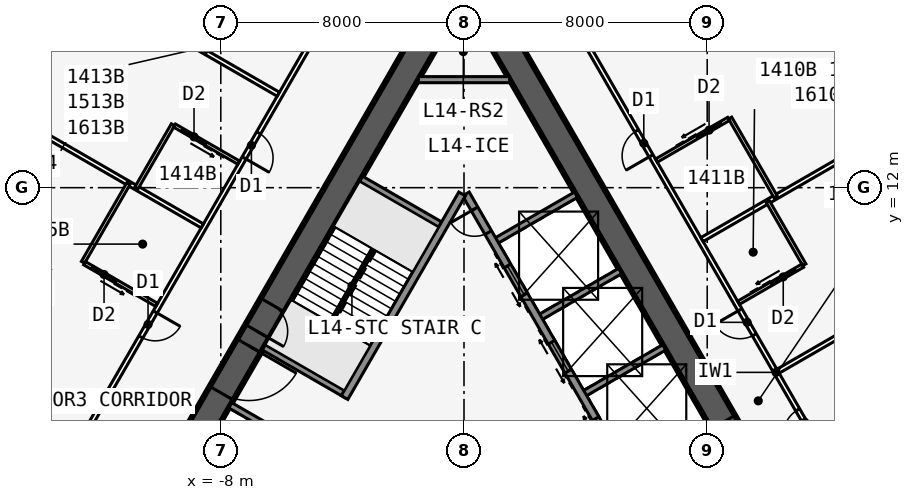
"""IFC4 building model, lengths in metres.
Left out: names, types, materials, properties, quantities, classifications, styles, units other than length and angle.
Written with IfcOpenShell. Run it as: python <this file> out.ifc"""

import sys

from ifc_helpers import new_model, si_unit, direction, frame, frame_2d, origin, place, context, subcontext, project, spatial, rectangle, extrude, element, fill, save


model = new_model("IFC4")
c1 = context("Model", 3, precision=1e-05, world=origin(), true_north=direction((0.0, 1.0)))
c2 = subcontext(c1, "Body", "Model", "MODEL_VIEW")
j1 = project(units=[si_unit("LENGTHUNIT", "METRE"), si_unit("PLANEANGLEUNIT", "RADIAN")], contexts=[c1])
p1 = place(None, origin())
s1 = spatial("IfcSite", under=j1, at=p1, CompositionType="ELEMENT")
p2 = place(p1, origin())
s2 = spatial("IfcBuilding", under=s1, at=p2, CompositionType="ELEMENT")
p3 = place(p2, frame((0.0, 0.0, 59.1)))
s3 = spatial("IfcBuildingStorey", under=s2, at=p3, CompositionType="ELEMENT", Elevation=59.1)
p4 = place(p3, frame((16.5, -9.526, 0.0), z_axis=(0.0, 0.0, 1.0), x_axis=(-0.499999749417, 0.866025548458, 0.0)))
e1 = element("IfcWall", 1, at=p4, inside=s3, PredefinedType="SHEAR", context=c2, shape_type="SweptSolid", body=[
    extrude(rectangle(XDim=33.0, YDim=0.9, at=frame_2d((16.5, 0.0))), origin(), (0.0, 0.0, 1.0), 3.4),
])
p5 = place(p4, frame((14.15, 0.0, 0.0)))
e2 = element("IfcOpeningElement", 2, at=p5, cuts=e1, PredefinedType="OPENING", context=c2, shape_type="SweptSolid", body=[
    extrude(rectangle(XDim=1.8, YDim=2.13, at=frame_2d((0.9, 1.065))), frame((0.0, 0.46, 0.0), z_axis=(0.0, -1.0, 0.0), x_axis=(1.0, 0.0, 0.0)), (0.0, 0.0, 1.0), 0.92),
])
p6 = place(p4, frame((12.6, 0.0, 0.0)))
e3 = element("IfcOpeningElement", 3, at=p6, cuts=e1, PredefinedType="OPENING", context=c2, shape_type="SweptSolid", body=[
    extrude(rectangle(XDim=1.0, YDim=2.13, at=frame_2d((0.5, 1.065))), frame((0.0, 0.46, 0.0), z_axis=(0.0, -1.0, 0.0), x_axis=(1.0, 0.0, 0.0)), (0.0, 0.0, 1.0), 0.92),
])
p7 = place(p3, frame((5.379, 2.586, 0.0), z_axis=(0.0, 0.0, 1.0), x_axis=(-0.500001375892, 0.866024609411, 0.0)))
e4 = element("IfcWall", 4, at=p7, inside=s3, PredefinedType="SOLIDWALL", context=c2, shape_type="SweptSolid", body=[
    extrude(rectangle(XDim=10.633, YDim=0.25, at=frame_2d((5.316, 0.0))), origin(), (0.0, 0.0, 1.0), 3.235),
])
p8 = place(p7, frame((9.164, 0.0, 0.0)))
e5 = element("IfcOpeningElement", 5, at=p8, cuts=e4, PredefinedType="OPENING", context=c2, shape_type="SweptSolid", body=[
    extrude(rectangle(XDim=0.9, YDim=2.13, at=frame_2d((0.45, 1.065))), frame((0.0, 0.135, 0.0), z_axis=(0.0, -1.0, 0.0), x_axis=(1.0, 0.0, 0.0)), (0.0, 0.0, 1.0), 0.27),
])
p9 = place(p7, frame((1.0, 0.0, 0.0)))
e6 = element("IfcOpeningElement", 6, at=p9, cuts=e4, PredefinedType="OPENING", context=c2, shape_type="SweptSolid", body=[
    extrude(rectangle(XDim=1.1, YDim=2.13, at=frame_2d((0.55, 1.065))), frame((0.0, 0.135, 0.0), z_axis=(0.0, -1.0, 0.0), x_axis=(1.0, 0.0, 0.0)), (0.0, 0.0, 1.0), 0.27),
])
p10 = place(p7, frame((3.9, 0.0, 0.0)))
e7 = element("IfcOpeningElement", 7, at=p10, cuts=e4, PredefinedType="OPENING", context=c2, shape_type="SweptSolid", body=[
    extrude(rectangle(XDim=1.1, YDim=2.13, at=frame_2d((0.55, 1.065))), frame((0.0, 0.135, 0.0), z_axis=(0.0, -1.0, 0.0), x_axis=(1.0, 0.0, 0.0)), (0.0, 0.0, 1.0), 0.27),
])
p11 = place(p7, frame((6.8, 0.0, 0.0)))
e8 = element("IfcOpeningElement", 8, at=p11, cuts=e4, PredefinedType="OPENING", context=c2, shape_type="SweptSolid", body=[
    extrude(rectangle(XDim=1.1, YDim=2.13, at=frame_2d((0.55, 1.065))), frame((0.0, 0.135, 0.0), z_axis=(0.0, -1.0, 0.0), x_axis=(1.0, 0.0, 0.0)), (0.0, 0.0, 1.0), 0.27),
])
for number, where, z_axis, x_axis in (
    (9, (3.879, 5.184, 0.0), (0.0, 0.0, 1.0), (0.866, 0.5, 0.0)),
    (10, (2.429, 7.696, 0.0), (0.0, 0.0, 1.0), (0.866, 0.5, 0.0)),
    (11, (0.979, 10.207, 0.0), (0.0, 0.0, 1.0), (0.866, 0.5, 0.0)),
):
    element("IfcWall", number, at=place(p3, frame(where, z_axis=z_axis, x_axis=x_axis)), inside=s3, PredefinedType="SOLIDWALL", context=c2, shape_type="SweptSolid", body=[
        extrude(rectangle(XDim=3.125, YDim=0.2, at=frame_2d((1.562, 0.0))), origin(), (0.0, 0.0, 1.0), 3.235),
    ])
p12 = place(p3, frame((0.0, 19.052, 0.0), z_axis=(0.0, 0.0, 1.0), x_axis=(-0.499999749417, -0.866025548458, 0.0)))
e12 = element("IfcWall", 12, at=p12, inside=s3, PredefinedType="SHEAR", context=c2, shape_type="SweptSolid", body=[
    extrude(rectangle(XDim=33.0, YDim=0.9, at=frame_2d((16.5, 0.0))), origin(), (0.0, 0.0, 1.0), 3.4),
])
p13 = place(p12, frame((14.15, 0.0, 0.0)))
e13 = element("IfcOpeningElement", 13, at=p13, cuts=e12, PredefinedType="OPENING", context=c2, shape_type="SweptSolid", body=[
    extrude(rectangle(XDim=1.8, YDim=2.13, at=frame_2d((0.9, 1.065))), frame((0.0, 0.46, 0.0), z_axis=(0.0, -1.0, 0.0), x_axis=(1.0, 0.0, 0.0)), (0.0, 0.0, 1.0), 0.92),
])
p14 = place(p12, frame((12.6, 0.0, 0.0)))
e14 = element("IfcOpeningElement", 14, at=p14, cuts=e12, PredefinedType="OPENING", context=c2, shape_type="SweptSolid", body=[
    extrude(rectangle(XDim=1.0, YDim=2.13, at=frame_2d((0.5, 1.065))), frame((0.0, 0.46, 0.0), z_axis=(0.0, -1.0, 0.0), x_axis=(1.0, 0.0, 0.0)), (0.0, 0.0, 1.0), 0.92),
])
p15 = place(p3, frame((-0.062, 11.794, 0.0), z_axis=(0.0, 0.0, 1.0), x_axis=(-0.500006680225, -0.86602154692, 0.0)))
e15 = element("IfcWall", 15, at=p15, inside=s3, PredefinedType="SOLIDWALL", context=c2, shape_type="SweptSolid", body=[
    extrude(rectangle(XDim=7.733, YDim=0.25, at=frame_2d((3.866, 0.0))), origin(), (0.0, 0.0, 1.0), 3.235),
])
for number, where, z_axis, x_axis in (
    (16, (-0.679, 10.727, 0.0), (0.0, 0.0, 1.0), (-0.866, 0.5, 0.0)),
    (17, (-3.879, 5.184, 0.0), (0.0, 0.0, 1.0), (-0.866, 0.5, 0.0)),
    (18, (-4.979, 3.279, 0.0), (0.0, 0.0, 1.0), (-0.866, 0.5, 0.0)),
):
    element("IfcWall", number, at=place(p3, frame(where, z_axis=z_axis, x_axis=x_axis)), inside=s3, PredefinedType="SOLIDWALL", context=c2, shape_type="SweptSolid", body=[
        extrude(rectangle(XDim=3.125, YDim=0.2, at=frame_2d((1.562, 0.0))), origin(), (0.0, 0.0, 1.0), 3.235),
    ])
p16 = place(p3, frame((20.027, -10.985, 0.0), z_axis=(0.0, 0.0, 1.0), x_axis=(-0.500001677587, 0.866024435227, 0.0)))
e19 = element("IfcWall", 19, at=p16, inside=s3, PredefinedType="PARTITIONING", context=c2, shape_type="SweptSolid", body=[
    extrude(rectangle(XDim=39.054, YDim=0.15, at=frame_2d((19.527, 0.0))), origin(), (0.0, 0.0, 1.0), 3.235),
])
p17 = place(p16, frame((0.352, 0.0, 0.0)))
e20 = element("IfcOpeningElement", 20, at=p17, cuts=e19, PredefinedType="OPENING", context=c2, shape_type="SweptSolid", body=[
    extrude(rectangle(XDim=0.95, YDim=2.13, at=frame_2d((0.475, 1.065))), frame((0.0, 0.085, 0.0), z_axis=(0.0, -1.0, 0.0), x_axis=(1.0, 0.0, 0.0)), (0.0, 0.0, 1.0), 0.17),
])
p18 = place(p16, frame((10.352, 0.0, 0.0)))
e21 = element("IfcOpeningElement", 21, at=p18, cuts=e19, PredefinedType="OPENING", context=c2, shape_type="SweptSolid", body=[
    extrude(rectangle(XDim=0.95, YDim=2.13, at=frame_2d((0.475, 1.065))), frame((0.0, 0.085, 0.0), z_axis=(0.0, -1.0, 0.0), x_axis=(1.0, 0.0, 0.0)), (0.0, 0.0, 1.0), 0.17),
])
p19 = place(p16, frame((17.152, 0.0, 0.0)))
e22 = element("IfcOpeningElement", 22, at=p19, cuts=e19, PredefinedType="OPENING", context=c2, shape_type="SweptSolid", body=[
    extrude(rectangle(XDim=0.95, YDim=2.13, at=frame_2d((0.475, 1.065))), frame((0.0, 0.085, 0.0), z_axis=(0.0, -1.0, 0.0), x_axis=(1.0, 0.0, 0.0)), (0.0, 0.0, 1.0), 0.17),
])
p20 = place(p16, frame((20.952, 0.0, 0.0)))
e23 = element("IfcOpeningElement", 23, at=p20, cuts=e19, PredefinedType="OPENING", context=c2, shape_type="SweptSolid", body=[
    extrude(rectangle(XDim=0.95, YDim=2.13, at=frame_2d((0.475, 1.065))), frame((0.0, 0.085, 0.0), z_axis=(0.0, -1.0, 0.0), x_axis=(1.0, 0.0, 0.0)), (0.0, 0.0, 1.0), 0.17),
])
p21 = place(p16, frame((27.752, 0.0, 0.0)))
e24 = element("IfcOpeningElement", 24, at=p21, cuts=e19, PredefinedType="OPENING", context=c2, shape_type="SweptSolid", body=[
    extrude(rectangle(XDim=0.95, YDim=2.13, at=frame_2d((0.475, 1.065))), frame((0.0, 0.085, 0.0), z_axis=(0.0, -1.0, 0.0), x_axis=(1.0, 0.0, 0.0)), (0.0, 0.0, 1.0), 0.17),
])
p22 = place(p16, frame((37.752, 0.0, 0.0)))
e25 = element("IfcOpeningElement", 25, at=p22, cuts=e19, PredefinedType="OPENING", context=c2, shape_type="SweptSolid", body=[
    extrude(rectangle(XDim=0.95, YDim=2.13, at=frame_2d((0.475, 1.065))), frame((0.0, 0.085, 0.0), z_axis=(0.0, -1.0, 0.0), x_axis=(1.0, 0.0, 0.0)), (0.0, 0.0, 1.0), 0.17),
])
p23 = place(p3, frame((10.329, 5.963, 0.0), z_axis=(0.0, 0.0, 1.0), x_axis=(0.866021688545, 0.500006434927, 0.0)))
e26 = element("IfcWall", 26, at=p23, inside=s3, PredefinedType="PARTITIONING", context=c2, shape_type="SweptSolid", body=[
    extrude(rectangle(XDim=10.096, YDim=0.15, at=frame_2d((5.048, 0.0))), origin(), (0.0, 0.0, 1.0), 2.389),
])
p24 = place(p3, frame((7.829, 10.293, 0.0), z_axis=(0.0, 0.0, 1.0), x_axis=(0.866016302457, 0.50001576363, 0.0)))
e27 = element("IfcWall", 27, at=p24, inside=s3, PredefinedType="PARTITIONING", context=c2, shape_type="SweptSolid", body=[
    extrude(rectangle(XDim=9.943, YDim=0.15, at=frame_2d((4.972, 0.0))), origin(), (0.0, 0.0, 1.0), 2.389),
])
p25 = place(p3, frame((11.628, 3.711, 0.0), z_axis=(0.0, 0.0, 1.0), x_axis=(0.866048967903, 0.499959183527, 0.0)))
e28 = element("IfcWall", 28, at=p25, inside=s3, PredefinedType="PLUMBINGWALL", context=c2, shape_type="SweptSolid", body=[
    extrude(rectangle(XDim=2.44, YDim=0.12, at=frame_2d((1.22, 0.0))), origin(), (0.0, 0.0, 1.0), 3.235),
])
p26 = place(p25, frame((1.25, 0.0, 0.0)))
e29 = element("IfcOpeningElement", 29, at=p26, cuts=e28, PredefinedType="OPENING", context=c2, shape_type="SweptSolid", body=[
    extrude(rectangle(XDim=0.9, YDim=2.13, at=frame_2d((0.45, 1.065))), frame((0.0, 0.07, 0.0), z_axis=(0.0, -1.0, 0.0), x_axis=(1.0, 0.0, 0.0)), (0.0, 0.0, 1.0), 0.14),
])
p27 = place(p3, frame((11.194, 9.465, 0.0), z_axis=(0.0, 0.0, 1.0), x_axis=(-0.500077600433, 0.865980596518, 0.0)))
e30 = element("IfcWall", 30, at=p27, inside=s3, PredefinedType="PLUMBINGWALL", context=c2, shape_type="SweptSolid", body=[
    extrude(rectangle(XDim=2.4, YDim=0.12, at=frame_2d((1.2, 0.0))), origin(), (0.0, 0.0, 1.0), 3.235),
])
p28 = place(p3, frame((9.029, 8.215, 0.0), z_axis=(0.0, 0.0, 1.0), x_axis=(0.866023955769, 0.500002508028, 0.0)))
e31 = element("IfcWall", 31, at=p28, inside=s3, PredefinedType="PLUMBINGWALL", context=c2, shape_type="SweptSolid", body=[
    extrude(rectangle(XDim=2.44, YDim=0.12, at=frame_2d((1.22, 0.0))), origin(), (0.0, 0.0, 1.0), 3.235),
])
p29 = place(p28, frame((1.25, 0.0, 0.0)))
e32 = element("IfcOpeningElement", 32, at=p29, cuts=e31, PredefinedType="OPENING", context=c2, shape_type="SweptSolid", body=[
    extrude(rectangle(XDim=0.9, YDim=2.13, at=frame_2d((0.45, 1.065))), frame((0.0, 0.07, 0.0), z_axis=(0.0, -1.0, 0.0), x_axis=(1.0, 0.0, 0.0)), (0.0, 0.0, 1.0), 0.14),
])
p30 = place(p3, frame((10.253, 11.693, 0.0), z_axis=(0.0, 0.0, 1.0), x_axis=(-0.50002537861, 0.866010750942, 0.0)))
e33 = element("IfcWall", 33, at=p30, inside=s3, PredefinedType="PLUMBINGWALL", context=c2, shape_type="SweptSolid", body=[
    extrude(rectangle(XDim=3.0, YDim=0.12, at=frame_2d((1.5, 0.0))), origin(), (0.0, 0.0, 1.0), 3.235),
])
p31 = place(p3, frame((6.329, 12.891, 0.0), z_axis=(0.0, 0.0, 1.0), x_axis=(0.866035715982, 0.499982138324, 0.0)))
e34 = element("IfcWall", 34, at=p31, inside=s3, PredefinedType="PLUMBINGWALL", context=c2, shape_type="SweptSolid", body=[
    extrude(rectangle(XDim=2.74, YDim=0.12, at=frame_2d((1.37, 0.0))), origin(), (0.0, 0.0, 1.0), 3.235),
])
p32 = place(p31, frame((1.55, 0.0, 0.0)))
e35 = element("IfcOpeningElement", 35, at=p32, cuts=e34, PredefinedType="OPENING", context=c2, shape_type="SweptSolid", body=[
    extrude(rectangle(XDim=0.9, YDim=2.13, at=frame_2d((0.45, 1.065))), frame((0.0, 0.07, 0.0), z_axis=(0.0, -1.0, 0.0), x_axis=(1.0, 0.0, 0.0)), (0.0, 0.0, 1.0), 0.14),
])
p33 = place(p3, frame((-0.5, 24.636, 0.0), z_axis=(0.0, 0.0, 1.0), x_axis=(-0.500001915564, -0.86602429783, 0.0)))
e36 = element("IfcWall", 36, at=p33, inside=s3, PredefinedType="PARTITIONING", context=c2, shape_type="SweptSolid", body=[
    extrude(rectangle(XDim=42.172, YDim=0.15, at=frame_2d((21.086, 0.0))), origin(), (0.0, 0.0, 1.0), 3.235),
])
p34 = place(p33, frame((2.338, 0.0, 0.0)))
e37 = element("IfcOpeningElement", 37, at=p34, cuts=e36, PredefinedType="OPENING", context=c2, shape_type="SweptSolid", body=[
    extrude(rectangle(XDim=0.95, YDim=2.13, at=frame_2d((0.475, 1.065))), frame((0.0, 0.085, 0.0), z_axis=(0.0, -1.0, 0.0), x_axis=(1.0, 0.0, 0.0)), (0.0, 0.0, 1.0), 0.17),
])
p35 = place(p33, frame((12.511, 0.0, 0.0)))
e38 = element("IfcOpeningElement", 38, at=p35, cuts=e36, PredefinedType="OPENING", context=c2, shape_type="SweptSolid", body=[
    extrude(rectangle(XDim=0.95, YDim=2.13, at=frame_2d((0.475, 1.065))), frame((0.0, 0.085, 0.0), z_axis=(0.0, -1.0, 0.0), x_axis=(1.0, 0.0, 0.0)), (0.0, 0.0, 1.0), 0.17),
])
p36 = place(p33, frame((19.311, 0.0, 0.0)))
e39 = element("IfcOpeningElement", 39, at=p36, cuts=e36, PredefinedType="OPENING", context=c2, shape_type="SweptSolid", body=[
    extrude(rectangle(XDim=0.95, YDim=2.13, at=frame_2d((0.475, 1.065))), frame((0.0, 0.085, 0.0), z_axis=(0.0, -1.0, 0.0), x_axis=(1.0, 0.0, 0.0)), (0.0, 0.0, 1.0), 0.17),
])
p37 = place(p33, frame((28.111, 0.0, 0.0)))
e40 = element("IfcOpeningElement", 40, at=p37, cuts=e36, PredefinedType="OPENING", context=c2, shape_type="SweptSolid", body=[
    extrude(rectangle(XDim=0.95, YDim=2.13, at=frame_2d((0.475, 1.065))), frame((0.0, 0.085, 0.0), z_axis=(0.0, -1.0, 0.0), x_axis=(1.0, 0.0, 0.0)), (0.0, 0.0, 1.0), 0.17),
])
p38 = place(p33, frame((39.311, 0.0, 0.0)))
e41 = element("IfcOpeningElement", 41, at=p38, cuts=e36, PredefinedType="OPENING", context=c2, shape_type="SweptSolid", body=[
    extrude(rectangle(XDim=0.95, YDim=2.13, at=frame_2d((0.475, 1.065))), frame((0.0, 0.085, 0.0), z_axis=(0.0, -1.0, 0.0), x_axis=(1.0, 0.0, 0.0)), (0.0, 0.0, 1.0), 0.17),
])
p39 = place(p3, frame((-6.108, 15.073, 0.0), z_axis=(0.0, 0.0, 1.0), x_axis=(-0.866031196456, 0.499989966665, 0.0)))
e42 = element("IfcWall", 42, at=p39, inside=s3, PredefinedType="PARTITIONING", context=c2, shape_type="SweptSolid", body=[
    extrude(rectangle(XDim=8.585, YDim=0.15, at=frame_2d((4.292, 0.0))), origin(), (0.0, 0.0, 1.0), 2.389),
])
p40 = place(p3, frame((-8.608, 10.743, 0.0), z_axis=(0.0, 0.0, 1.0), x_axis=(-0.866028232062, 0.499995101247, 0.0)))
e43 = element("IfcWall", 43, at=p40, inside=s3, PredefinedType="PARTITIONING", context=c2, shape_type="SweptSolid", body=[
    extrude(rectangle(XDim=9.043, YDim=0.15, at=frame_2d((4.521, 0.0))), origin(), (0.0, 0.0, 1.0), 2.389),
])
p41 = place(p3, frame((-7.033, 19.072, 0.0), z_axis=(0.0, 0.0, 1.0), x_axis=(-0.499990139034, -0.866031096941, 0.0)))
e44 = element("IfcWall", 44, at=p41, inside=s3, PredefinedType="PLUMBINGWALL", context=c2, shape_type="SweptSolid", body=[
    extrude(rectangle(XDim=3.0, YDim=0.12, at=frame_2d((1.5, 0.0))), origin(), (0.0, 0.0, 1.0), 3.235),
])
p42 = place(p3, frame((-9.573, 14.072, 0.0), z_axis=(0.0, 0.0, 1.0), x_axis=(-0.500001309137, -0.866024647952, 0.0)))
e45 = element("IfcWall", 45, at=p42, inside=s3, PredefinedType="PLUMBINGWALL", context=c2, shape_type="SweptSolid", body=[
    extrude(rectangle(XDim=2.4, YDim=0.12, at=frame_2d((1.2, 0.0))), origin(), (0.0, 0.0, 1.0), 3.235),
])
p43 = place(p3, frame((-7.408, 12.822, 0.0), z_axis=(0.0, 0.0, 1.0), x_axis=(-0.866023955769, 0.500002508028, 0.0)))
e46 = element("IfcWall", 46, at=p43, inside=s3, PredefinedType="PLUMBINGWALL", context=c2, shape_type="SweptSolid", body=[
    extrude(rectangle(XDim=2.44, YDim=0.12, at=frame_2d((1.22, 0.0))), origin(), (0.0, 0.0, 1.0), 3.235),
])
p44 = place(p43, frame((1.25, 0.0, 0.0)))
e47 = element("IfcOpeningElement", 47, at=p44, cuts=e46, PredefinedType="OPENING", context=c2, shape_type="SweptSolid", body=[
    extrude(rectangle(XDim=0.9, YDim=2.13, at=frame_2d((0.45, 1.065))), frame((0.0, 0.07, 0.0), z_axis=(0.0, -1.0, 0.0), x_axis=(1.0, 0.0, 0.0)), (0.0, 0.0, 1.0), 0.14),
])
p45 = place(p3, frame((-11.033, 12.143, 0.0), z_axis=(0.0, 0.0, 1.0), x_axis=(-0.499990139034, -0.866031096941, 0.0)))
e48 = element("IfcWall", 48, at=p45, inside=s3, PredefinedType="PLUMBINGWALL", context=c2, shape_type="SweptSolid", body=[
    extrude(rectangle(XDim=3.0, YDim=0.12, at=frame_2d((1.5, 0.0))), origin(), (0.0, 0.0, 1.0), 3.235),
])
p46 = place(p3, frame((-10.108, 8.145, 0.0), z_axis=(0.0, 0.0, 1.0), x_axis=(-0.866035715982, 0.499982138324, 0.0)))
e49 = element("IfcWall", 49, at=p46, inside=s3, PredefinedType="PLUMBINGWALL", context=c2, shape_type="SweptSolid", body=[
    extrude(rectangle(XDim=2.74, YDim=0.12, at=frame_2d((1.37, 0.0))), origin(), (0.0, 0.0, 1.0), 3.235),
])
p47 = place(p46, frame((1.55, 0.0, 0.0)))
e50 = element("IfcOpeningElement", 50, at=p47, cuts=e49, PredefinedType="OPENING", context=c2, shape_type="SweptSolid", body=[
    extrude(rectangle(XDim=0.9, YDim=2.13, at=frame_2d((0.45, 1.065))), frame((0.0, 0.07, 0.0), z_axis=(0.0, -1.0, 0.0), x_axis=(1.0, 0.0, 0.0)), (0.0, 0.0, 1.0), 0.14),
])
p48 = place(p3, frame((-1.501, 15.552, 0.0), z_axis=(0.0, 0.0, 1.0), x_axis=(1.0, 0.0, 0.0)))
e51 = element("IfcWall", 51, at=p48, inside=s3, PredefinedType="SOLIDWALL", context=c2, shape_type="SweptSolid", body=[
    extrude(rectangle(XDim=3.002, YDim=0.2, at=frame_2d((1.501, 0.0))), origin(), (0.0, 0.0, 1.0), 3.235),
])
p49 = place(p3, frame((-2.988, 9.978, 0.0), z_axis=(0.0, 0.0, 1.0), x_axis=(-0.499992232847, -0.866029888106, 0.0)))
e52 = element("IfcWall", 52, at=p49, inside=s3, PredefinedType="SOLIDWALL", context=c2, shape_type="SweptSolid", body=[
    extrude(rectangle(XDim=2.794, YDim=0.1, at=frame_2d((1.397, 0.0))), origin(), (0.0, 0.0, 1.0), 3.4),
])
p50 = place(p19, origin())
e53 = element("IfcDoor", 53, at=p50, inside=s3, OperationType="SINGLE_SWING_LEFT", PredefinedType="DOOR", context=c2, shape_type="SweptSolid", body=[
    extrude(rectangle(XDim=0.95, YDim=2.13, at=frame_2d((0.475, 1.065))), frame((0.0, 0.025, 0.0), z_axis=(0.0, -1.0, 0.0), x_axis=(1.0, 0.0, 0.0)), (0.0, 0.0, 1.0), 0.05),
])
fill(e22, e53)
p51 = place(p29, origin())
e54 = element("IfcDoor", 54, at=p51, inside=s3, OperationType="SLIDING_TO_LEFT", PredefinedType="DOOR", context=c2, shape_type="SweptSolid", body=[
    extrude(rectangle(XDim=0.9, YDim=2.13, at=frame_2d((0.45, 1.065))), frame((0.0, 0.025, 0.0), z_axis=(0.0, -1.0, 0.0), x_axis=(1.0, 0.0, 0.0)), (0.0, 0.0, 1.0), 0.05),
])
fill(e32, e54)
p52 = place(p20, origin())
e55 = element("IfcDoor", 55, at=p52, inside=s3, OperationType="SINGLE_SWING_RIGHT", PredefinedType="DOOR", context=c2, shape_type="SweptSolid", body=[
    extrude(rectangle(XDim=0.95, YDim=2.13, at=frame_2d((0.475, 1.065))), frame((0.0, 0.025, 0.0), z_axis=(0.0, -1.0, 0.0), x_axis=(1.0, 0.0, 0.0)), (0.0, 0.0, 1.0), 0.05),
])
fill(e23, e55)
p53 = place(p32, origin())
e56 = element("IfcDoor", 56, at=p53, inside=s3, OperationType="SLIDING_TO_LEFT", PredefinedType="DOOR", context=c2, shape_type="SweptSolid", body=[
    extrude(rectangle(XDim=0.9, YDim=2.13, at=frame_2d((0.45, 1.065))), frame((0.0, 0.025, 0.0), z_axis=(0.0, -1.0, 0.0), x_axis=(1.0, 0.0, 0.0)), (0.0, 0.0, 1.0), 0.05),
])
fill(e35, e56)
p54 = place(p21, origin())
e57 = element("IfcDoor", 57, at=p54, inside=s3, OperationType="SINGLE_SWING_LEFT", PredefinedType="DOOR", context=c2, shape_type="SweptSolid", body=[
    extrude(rectangle(XDim=0.95, YDim=2.13, at=frame_2d((0.475, 1.065))), frame((0.0, 0.025, 0.0), z_axis=(0.0, -1.0, 0.0), x_axis=(1.0, 0.0, 0.0)), (0.0, 0.0, 1.0), 0.05),
])
fill(e24, e57)
p55 = place(p44, origin())
e58 = element("IfcDoor", 58, at=p55, inside=s3, OperationType="SLIDING_TO_LEFT", PredefinedType="DOOR", context=c2, shape_type="SweptSolid", body=[
    extrude(rectangle(XDim=0.9, YDim=2.13, at=frame_2d((0.45, 1.065))), frame((0.0, 0.025, 0.0), z_axis=(0.0, -1.0, 0.0), x_axis=(1.0, 0.0, 0.0)), (0.0, 0.0, 1.0), 0.05),
])
fill(e47, e58)
p56 = place(p35, origin())
e59 = element("IfcDoor", 59, at=p56, inside=s3, OperationType="SINGLE_SWING_RIGHT", PredefinedType="DOOR", context=c2, shape_type="SweptSolid", body=[
    extrude(rectangle(XDim=0.95, YDim=2.13, at=frame_2d((0.475, 1.065))), frame((0.0, 0.025, 0.0), z_axis=(0.0, -1.0, 0.0), x_axis=(1.0, 0.0, 0.0)), (0.0, 0.0, 1.0), 0.05),
])
fill(e38, e59)
p57 = place(p47, origin())
e60 = element("IfcDoor", 60, at=p57, inside=s3, OperationType="SLIDING_TO_LEFT", PredefinedType="DOOR", context=c2, shape_type="SweptSolid", body=[
    extrude(rectangle(XDim=0.9, YDim=2.13, at=frame_2d((0.45, 1.065))), frame((0.0, 0.025, 0.0), z_axis=(0.0, -1.0, 0.0), x_axis=(1.0, 0.0, 0.0)), (0.0, 0.0, 1.0), 0.05),
])
fill(e50, e60)
p58 = place(p36, origin())
e61 = element("IfcDoor", 61, at=p58, inside=s3, OperationType="SINGLE_SWING_LEFT", PredefinedType="DOOR", context=c2, shape_type="SweptSolid", body=[
    extrude(rectangle(XDim=0.95, YDim=2.13, at=frame_2d((0.475, 1.065))), frame((0.0, 0.025, 0.0), z_axis=(0.0, -1.0, 0.0), x_axis=(1.0, 0.0, 0.0)), (0.0, 0.0, 1.0), 0.05),
])
fill(e39, e61)
p59 = place(p13, origin())
e62 = element("IfcDoor", 62, at=p59, inside=s3, OperationType="DOUBLE_DOOR_SINGLE_SWING", PredefinedType="DOOR", context=c2, shape_type="SweptSolid", body=[
    extrude(rectangle(XDim=1.8, YDim=2.13, at=frame_2d((0.9, 1.065))), frame((0.0, 0.025, 0.0), z_axis=(0.0, -1.0, 0.0), x_axis=(1.0, 0.0, 0.0)), (0.0, 0.0, 1.0), 0.05),
])
fill(e13, e62)
p60 = place(p14, origin())
e63 = element("IfcDoor", 63, at=p60, inside=s3, OperationType="SINGLE_SWING_RIGHT", PredefinedType="DOOR", context=c2, shape_type="SweptSolid", body=[
    extrude(rectangle(XDim=1.0, YDim=2.13, at=frame_2d((0.5, 1.065))), frame((0.0, 0.025, 0.0), z_axis=(0.0, -1.0, 0.0), x_axis=(1.0, 0.0, 0.0)), (0.0, 0.0, 1.0), 0.05),
])
fill(e14, e63)
p61 = place(p8, origin())
e64 = element("IfcDoor", 64, at=p61, inside=s3, OperationType="SINGLE_SWING_RIGHT", PredefinedType="DOOR", context=c2, shape_type="SweptSolid", body=[
    extrude(rectangle(XDim=0.9, YDim=2.13, at=frame_2d((0.45, 1.065))), frame((0.0, 0.025, 0.0), z_axis=(0.0, -1.0, 0.0), x_axis=(1.0, 0.0, 0.0)), (0.0, 0.0, 1.0), 0.05),
])
fill(e5, e64)
p62 = place(p9, origin())
e65 = element("IfcDoor", 65, at=p62, inside=s3, OperationType="DOUBLE_DOOR_SLIDING", PredefinedType="USERDEFINED", context=c2, shape_type="SweptSolid", body=[
    extrude(rectangle(XDim=1.1, YDim=2.13, at=frame_2d((0.55, 1.065))), frame((0.0, 0.025, 0.0), z_axis=(0.0, -1.0, 0.0), x_axis=(1.0, 0.0, 0.0)), (0.0, 0.0, 1.0), 0.05),
])
fill(e6, e65)
p63 = place(p10, origin())
e66 = element("IfcDoor", 66, at=p63, inside=s3, OperationType="DOUBLE_DOOR_SLIDING", PredefinedType="USERDEFINED", context=c2, shape_type="SweptSolid", body=[
    extrude(rectangle(XDim=1.1, YDim=2.13, at=frame_2d((0.55, 1.065))), frame((0.0, 0.025, 0.0), z_axis=(0.0, -1.0, 0.0), x_axis=(1.0, 0.0, 0.0)), (0.0, 0.0, 1.0), 0.05),
])
fill(e7, e66)
p64 = place(p11, origin())
e67 = element("IfcDoor", 67, at=p64, inside=s3, OperationType="DOUBLE_DOOR_SLIDING", PredefinedType="USERDEFINED", context=c2, shape_type="SweptSolid", body=[
    extrude(rectangle(XDim=1.1, YDim=2.13, at=frame_2d((0.55, 1.065))), frame((0.0, 0.025, 0.0), z_axis=(0.0, -1.0, 0.0), x_axis=(1.0, 0.0, 0.0)), (0.0, 0.0, 1.0), 0.05),
])
fill(e8, e67)
save(model, sys.argv[1])
